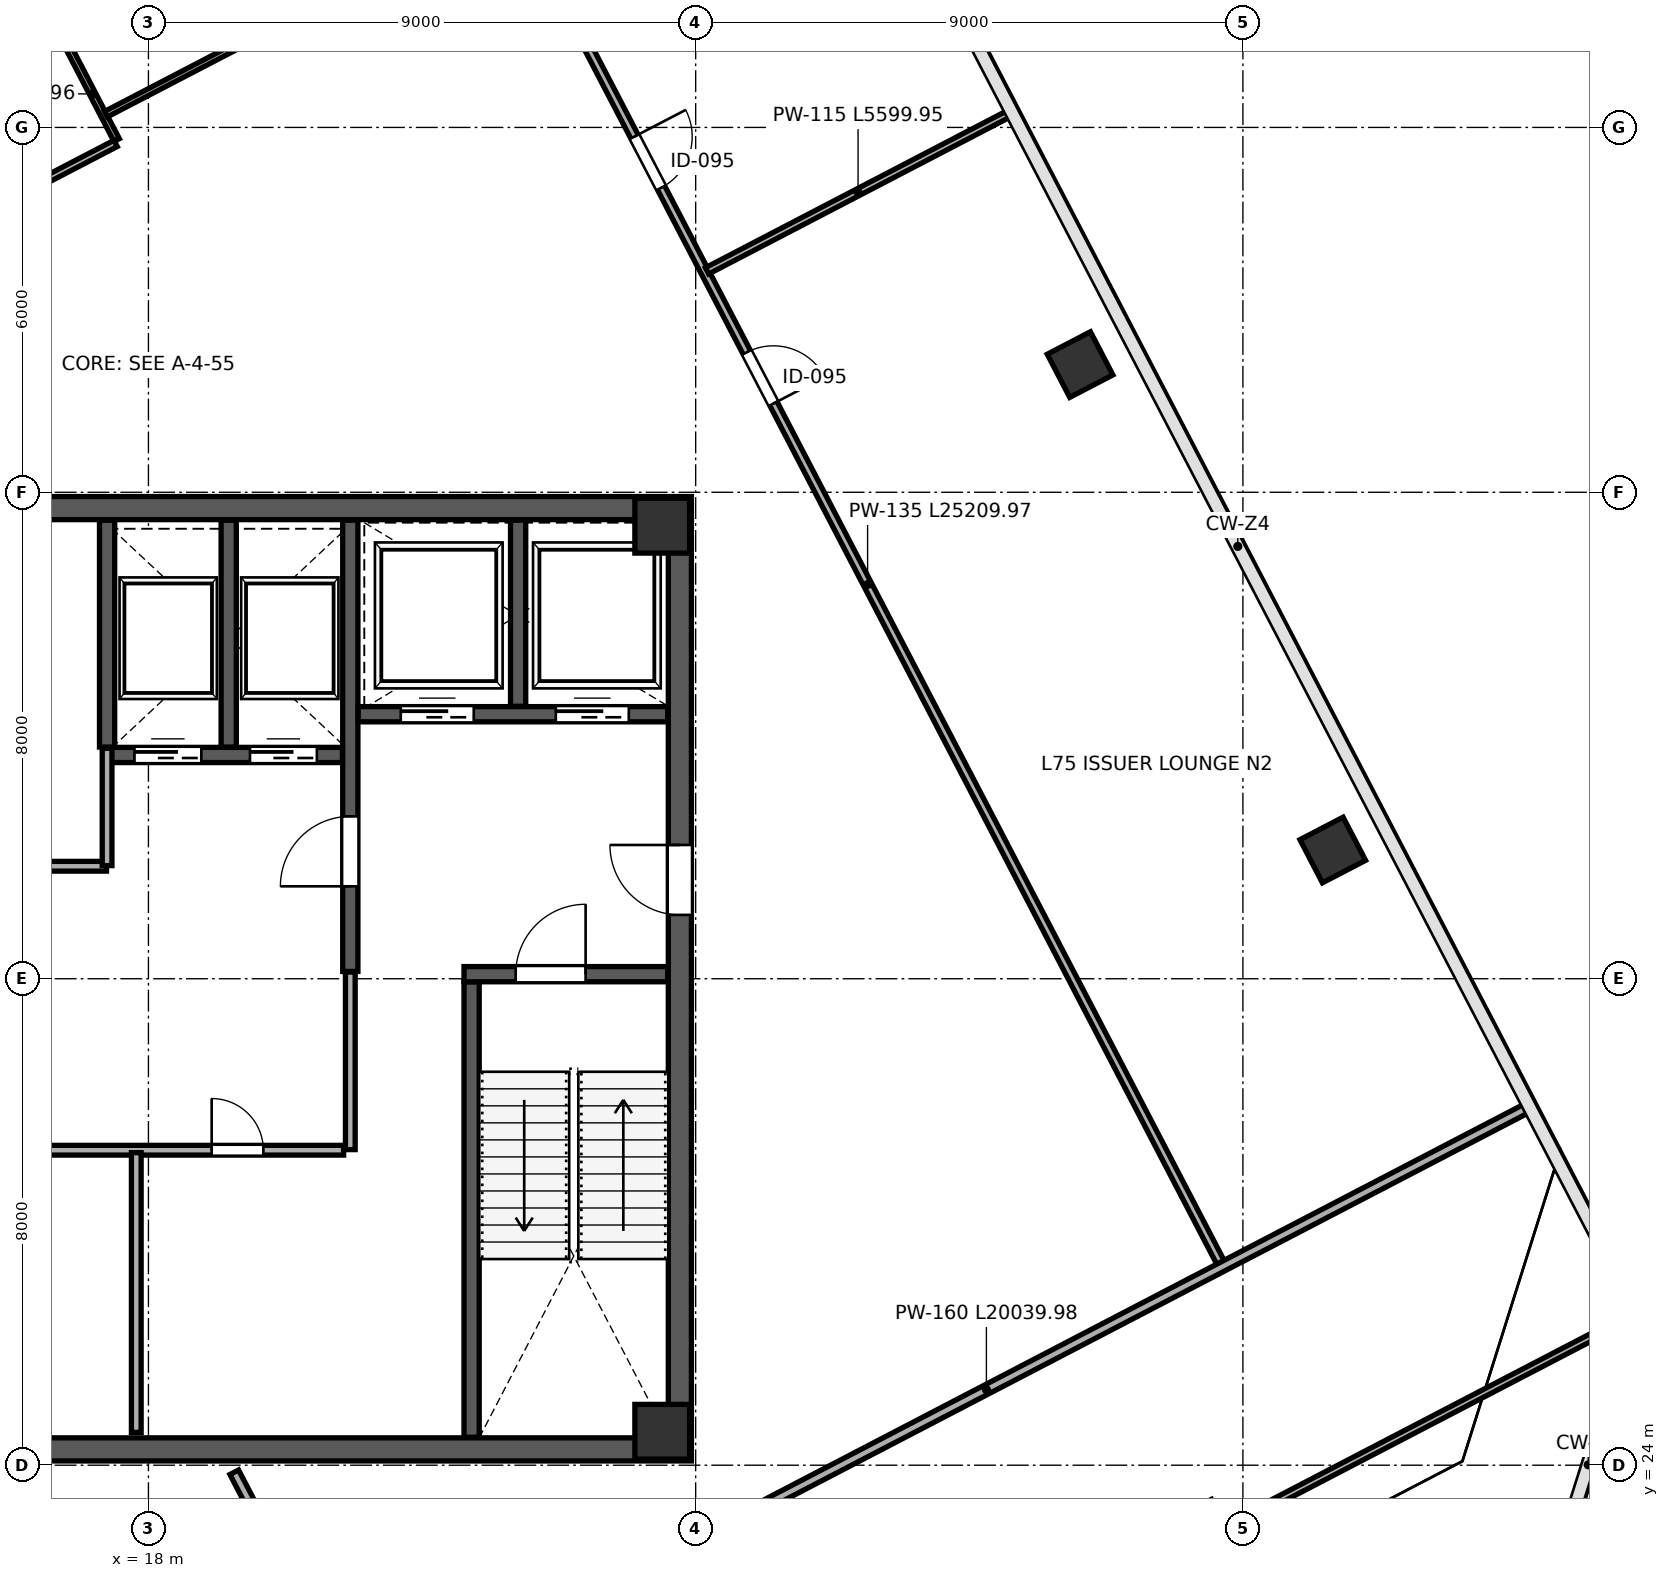
"""IFC4 building model, lengths in metres.
Left out: names, types, materials, properties, quantities, classifications, styles, units other than length and angle.
Written with IfcOpenShell. Run it as: python <this file> out.ifc"""

import sys

from ifc_helpers import new_model, si_unit, direction, frame, frame_2d, origin, origin_2d, place, context, subcontext, project, spatial, rectangle, extrude, source, transform, mapped, element, fill, save


model = new_model("IFC4")
c1 = context("Model", 3, precision=1e-05, world=origin(), true_north=direction((0.0, 1.0)))
c2 = subcontext(c1, "Body", "Model", "MODEL_VIEW")
j1 = project(units=[si_unit("LENGTHUNIT", "METRE"), si_unit("PLANEANGLEUNIT", "RADIAN")], contexts=[c1])
p1 = place(None, origin())
s1 = spatial("IfcSite", under=j1, at=p1, CompositionType="ELEMENT")
p2 = place(p1, origin())
s2 = spatial("IfcBuilding", under=s1, at=p2, CompositionType="ELEMENT")
p3 = place(p2, frame((0.0, 0.0, 332.4)))
s3 = spatial("IfcBuildingStorey", under=s2, at=p3, CompositionType="ELEMENT", Elevation=332.4)
m1 = source(origin(), c2, "Body", "SweptSolid", [
    extrude(rectangle(XDim=0.9, YDim=0.9, at=origin_2d()), origin(), (0.0, 0.0, 1.0), 4.199),
])
for number, where, z_axis, x_axis in (
    (1, (26.45, 24.55, 0.001), (0.0, 0.0, 1.0), (1.0, 0.0, 0.0)),
    (2, (26.45, 39.45, 0.001), (0.0, 0.0, 1.0), (1.0, 0.0, 0.0)),
):
    element("IfcColumn", number, at=place(p3, frame(where, z_axis=z_axis, x_axis=x_axis)), inside=s3, PredefinedType="COLUMN", context=c2, shape_type="MappedRepresentation", body=[
        mapped(m1, transform((0.0, 0.0, 0.0), scale=1.0)),
    ])
m2 = source(origin(), c2, "Body", "SweptSolid", [
    extrude(rectangle(XDim=0.8, YDim=0.8, at=origin_2d()), origin(), (0.0, 0.0, 1.0), 4.199),
])
for number, where, z_axis, x_axis in (
    (3, (33.322, 42.1, 0.001), (0.0, 0.0, 1.0), (-0.462, 0.887, 0.0)),
    (4, (37.478, 34.117, 0.001), (0.0, 0.0, 1.0), (-0.462, 0.887, 0.0)),
):
    element("IfcColumn", number, at=place(p3, frame(where, z_axis=z_axis, x_axis=x_axis)), inside=s3, PredefinedType="COLUMN", context=c2, shape_type="MappedRepresentation", body=[
        mapped(m2, transform((0.0, 0.0, 0.0), scale=1.0)),
    ])
p4 = place(p3, frame((26.74, 24.45, 0.0), z_axis=(0.0, 0.0, 1.0), x_axis=(0.0, 1.0, 0.0)))
e5 = element("IfcWall", 5, at=p4, inside=s3, PredefinedType="SHEAR", context=c2, shape_type="SweptSolid", body=[
    extrude(rectangle(XDim=15.1, YDim=0.38, at=frame_2d((7.55, 0.0))), origin(), (0.0, 0.0, 1.0), 3.96),
])
p5 = place(p4, frame((8.6, 0.0, 0.0)))
e6 = element("IfcOpeningElement", 6, at=p5, cuts=e5, PredefinedType="OPENING", context=c2, shape_type="SweptSolid", body=[
    extrude(rectangle(XDim=1.15, YDim=2.2, at=frame_2d((0.575, 1.1))), frame((0.0, 0.2, 0.0), z_axis=(0.0, -1.0, 0.0), x_axis=(1.0, 0.0, 0.0)), (0.0, 0.0, 1.0), 0.4),
])
for number, where, z_axis, x_axis in (
    (7, (9.07, 24.26, 0.0), (0.0, 0.0, 1.0), (1.0, 0.0, 0.0)),
    (8, (9.07, 39.74, 0.0), (0.0, 0.0, 1.0), (1.0, 0.0, 0.0)),
):
    element("IfcWall", number, at=place(p3, frame(where, z_axis=z_axis, x_axis=x_axis)), inside=s3, PredefinedType="SHEAR", context=c2, shape_type="SweptSolid", body=[
        extrude(rectangle(XDim=17.86, YDim=0.38, at=frame_2d((8.93, 0.0))), origin(), (0.0, 0.0, 1.0), 3.96),
    ])
p6 = place(p3, frame((23.315, 24.46, 0.0), z_axis=(0.0, 0.0, 1.0), x_axis=(0.0, 1.0, 0.0)))
e9 = element("IfcWall", 9, at=p6, inside=s3, PredefinedType="SHEAR", context=c2, shape_type="SweptSolid", body=[
    extrude(rectangle(XDim=7.49, YDim=0.25, at=frame_2d((3.745, 0.0))), origin(), (0.0, 0.0, 1.0), 3.96),
])
p7 = place(p3, frame((23.19, 32.075, 0.0), z_axis=(0.0, 0.0, 1.0), x_axis=(1.0, 0.0, 0.0)))
e10 = element("IfcWall", 10, at=p7, inside=s3, PredefinedType="SHEAR", context=c2, shape_type="SweptSolid", body=[
    extrude(rectangle(XDim=3.35, YDim=0.25, at=frame_2d((1.675, 0.0))), origin(), (0.0, 0.0, 1.0), 3.96),
])
p8 = place(p7, frame((0.85, 0.0, 0.0)))
e11 = element("IfcOpeningElement", 11, at=p8, cuts=e10, PredefinedType="OPENING", context=c2, shape_type="SweptSolid", body=[
    extrude(rectangle(XDim=1.15, YDim=2.2, at=frame_2d((0.575, 1.1))), frame((0.0, 0.135, 0.0), z_axis=(0.0, -1.0, 0.0), x_axis=(1.0, 0.0, 0.0)), (0.0, 0.0, 1.0), 0.27),
])
p9 = place(p3, frame((21.32, 32.12, 0.0), z_axis=(0.0, 0.0, 1.0), x_axis=(0.0, 1.0, 0.0)))
e12 = element("IfcWall", 12, at=p9, inside=s3, PredefinedType="SHEAR", context=c2, shape_type="SweptSolid", body=[
    extrude(rectangle(XDim=7.42, YDim=0.25, at=frame_2d((3.71, 0.0))), origin(), (0.0, 0.0, 1.0), 3.96),
])
p10 = place(p9, frame((1.4, 0.0, 0.0)))
e13 = element("IfcOpeningElement", 13, at=p10, cuts=e12, PredefinedType="OPENING", context=c2, shape_type="SweptSolid", body=[
    extrude(rectangle(XDim=1.15, YDim=2.2, at=frame_2d((0.575, 1.1))), frame((0.0, 0.135, 0.0), z_axis=(0.0, -1.0, 0.0), x_axis=(1.0, 0.0, 0.0)), (0.0, 0.0, 1.0), 0.27),
])
p11 = place(p3, frame((21.45, 36.35, 0.0), z_axis=(0.0, 0.0, 1.0), x_axis=(1.0, 0.0, 0.0)))
e14 = element("IfcWall", 14, at=p11, inside=s3, PredefinedType="SHEAR", context=c2, shape_type="SweptSolid", body=[
    extrude(rectangle(XDim=5.09, YDim=0.25, at=frame_2d((2.545, 0.0))), origin(), (0.0, 0.0, 1.0), 3.96),
])
p12 = place(p11, frame((0.7, 0.0, 0.0)))
e15 = element("IfcOpeningElement", 15, at=p12, cuts=e14, PredefinedType="OPENING", context=c2, shape_type="SweptSolid", body=[
    extrude(rectangle(XDim=1.2, YDim=2.2, at=frame_2d((0.6, 1.1))), frame((0.0, 0.135, 0.0), z_axis=(0.0, -1.0, 0.0), x_axis=(1.0, 0.0, 0.0)), (0.0, 0.0, 1.0), 0.27),
])
p13 = place(p11, frame((3.25, 0.0, 0.0)))
e16 = element("IfcOpeningElement", 16, at=p13, cuts=e14, PredefinedType="OPENING", context=c2, shape_type="SweptSolid", body=[
    extrude(rectangle(XDim=1.2, YDim=2.2, at=frame_2d((0.6, 1.1))), frame((0.0, 0.135, 0.0), z_axis=(0.0, -1.0, 0.0), x_axis=(1.0, 0.0, 0.0)), (0.0, 0.0, 1.0), 0.27),
])
p14 = place(p3, frame((24.08, 36.48, 0.0), z_axis=(0.0, 0.0, 1.0), x_axis=(0.0, 1.0, 0.0)))
e17 = element("IfcWall", 17, at=p14, inside=s3, PredefinedType="SHEAR", context=c2, shape_type="SweptSolid", body=[
    extrude(rectangle(XDim=3.06, YDim=0.25, at=frame_2d((1.53, 0.0))), origin(), (0.0, 0.0, 1.0), 3.96),
])
p15 = place(p3, frame((17.32, 35.68, 0.0), z_axis=(0.0, 0.0, 1.0), x_axis=(1.0, 0.0, 0.0)))
e18 = element("IfcWall", 18, at=p15, inside=s3, PredefinedType="SHEAR", context=c2, shape_type="SweptSolid", body=[
    extrude(rectangle(XDim=3.87, YDim=0.25, at=frame_2d((1.935, 0.0))), origin(), (0.0, 0.0, 1.0), 3.96),
])
p16 = place(p15, frame((0.45, 0.0, 0.0)))
e19 = element("IfcOpeningElement", 19, at=p16, cuts=e18, PredefinedType="OPENING", context=c2, shape_type="SweptSolid", body=[
    extrude(rectangle(XDim=1.1, YDim=2.2, at=frame_2d((0.55, 1.1))), frame((0.0, 0.135, 0.0), z_axis=(0.0, -1.0, 0.0), x_axis=(1.0, 0.0, 0.0)), (0.0, 0.0, 1.0), 0.27),
])
p17 = place(p15, frame((2.35, 0.0, 0.0)))
e20 = element("IfcOpeningElement", 20, at=p17, cuts=e18, PredefinedType="OPENING", context=c2, shape_type="SweptSolid", body=[
    extrude(rectangle(XDim=1.1, YDim=2.2, at=frame_2d((0.55, 1.1))), frame((0.0, 0.135, 0.0), z_axis=(0.0, -1.0, 0.0), x_axis=(1.0, 0.0, 0.0)), (0.0, 0.0, 1.0), 0.27),
])
for number, where, z_axis, x_axis in (
    (21, (17.32, 35.81, 0.0), (0.0, 0.0, 1.0), (0.0, 1.0, 0.0)),
    (22, (19.32, 35.81, 0.0), (0.0, 0.0, 1.0), (0.0, 1.0, 0.0)),
):
    element("IfcWall", number, at=place(p3, frame(where, z_axis=z_axis, x_axis=x_axis)), inside=s3, PredefinedType="SHEAR", context=c2, shape_type="SweptSolid", body=[
        extrude(rectangle(XDim=3.73, YDim=0.25, at=frame_2d((1.865, 0.0))), origin(), (0.0, 0.0, 1.0), 3.96),
    ])
p18 = place(p3, frame((13.21, 33.85, 0.0), z_axis=(0.0, 0.0, 1.0), x_axis=(1.0, 0.0, 0.0)))
e23 = element("IfcWall", 23, at=p18, inside=s3, PredefinedType="PARTITIONING", context=c2, shape_type="SweptSolid", body=[
    extrude(rectangle(XDim=4.1, YDim=0.16, at=frame_2d((2.05, 0.0))), origin(), (0.0, 0.0, 1.0), 3.96),
])
p19 = place(p18, frame((1.35, 0.0, 0.0)))
e24 = element("IfcOpeningElement", 24, at=p19, cuts=e23, PredefinedType="OPENING", context=c2, shape_type="SweptSolid", body=[
    extrude(rectangle(XDim=0.9, YDim=2.15, at=frame_2d((0.45, 1.075))), frame((0.0, 0.09, 0.0), z_axis=(0.0, -1.0, 0.0), x_axis=(1.0, 0.0, 0.0)), (0.0, 0.0, 1.0), 0.18),
])
p20 = place(p3, frame((17.32, 33.86, 0.0), z_axis=(0.0, 0.0, 1.0), x_axis=(0.0, 1.0, 0.0)))
e25 = element("IfcWall", 25, at=p20, inside=s3, PredefinedType="PARTITIONING", context=c2, shape_type="SweptSolid", body=[
    extrude(rectangle(XDim=1.93, YDim=0.16, at=frame_2d((0.965, 0.0))), origin(), (0.0, 0.0, 1.0), 3.96),
])
p21 = place(p3, frame((12.84, 29.18, 0.0), z_axis=(0.0, 0.0, 1.0), x_axis=(1.0, 0.0, 0.0)))
e26 = element("IfcWall", 26, at=p21, inside=s3, PredefinedType="PARTITIONING", context=c2, shape_type="SweptSolid", body=[
    extrude(rectangle(XDim=8.37, YDim=0.16, at=frame_2d((4.185, 0.0))), origin(), (0.0, 0.0, 1.0), 3.96),
])
p22 = place(p21, frame((2.1, 0.0, 0.0)))
e27 = element("IfcOpeningElement", 27, at=p22, cuts=e26, PredefinedType="OPENING", context=c2, shape_type="SweptSolid", body=[
    extrude(rectangle(XDim=0.9, YDim=2.15, at=frame_2d((0.45, 1.075))), frame((0.0, 0.09, 0.0), z_axis=(0.0, -1.0, 0.0), x_axis=(1.0, 0.0, 0.0)), (0.0, 0.0, 1.0), 0.18),
])
p23 = place(p21, frame((6.2, 0.0, 0.0)))
e28 = element("IfcOpeningElement", 28, at=p23, cuts=e26, PredefinedType="OPENING", context=c2, shape_type="SweptSolid", body=[
    extrude(rectangle(XDim=0.85, YDim=2.1, at=frame_2d((0.425, 1.05))), frame((0.0, 0.09, 0.0), z_axis=(0.0, -1.0, 0.0), x_axis=(1.0, 0.0, 0.0)), (0.0, 0.0, 1.0), 0.18),
])
p24 = place(p3, frame((17.8, 24.54, 0.0), z_axis=(0.0, 0.0, 1.0), x_axis=(0.0, 1.0, 0.0)))
e29 = element("IfcWall", 29, at=p24, inside=s3, PredefinedType="PARTITIONING", context=c2, shape_type="SweptSolid", body=[
    extrude(rectangle(XDim=4.6, YDim=0.16, at=frame_2d((2.3, 0.0))), origin(), (0.0, 0.0, 1.0), 3.96),
])
p25 = place(p3, frame((21.32, 29.19, 0.0), z_axis=(0.0, 0.0, 1.0), x_axis=(0.0, 1.0, 0.0)))
e30 = element("IfcWall", 30, at=p25, inside=s3, PredefinedType="PARTITIONING", context=c2, shape_type="SweptSolid", body=[
    extrude(rectangle(XDim=2.92, YDim=0.16, at=frame_2d((1.46, 0.0))), origin(), (0.0, 0.0, 1.0), 3.96),
])
p26 = place(p3, frame((19.411, 23.885, 0.0), z_axis=(0.0, 0.0, 1.0), x_axis=(0.461717603384, -0.887026975196, 0.0)))
e31 = element("IfcWall", 31, at=p26, inside=s3, PredefinedType="PARTITIONING", context=c2, shape_type="SweptSolid", body=[
    extrude(rectangle(XDim=4.466, YDim=0.16, at=frame_2d((2.233, 0.0))), origin(), (0.0, 0.0, 1.0), 3.96),
])
p27 = place(p3, frame((24.007, 49.664, 0.0), z_axis=(0.0, 0.0, 1.0), x_axis=(0.461753963132, -0.887008048178, 0.0)))
e32 = element("IfcWall", 32, at=p27, inside=s3, PredefinedType="PARTITIONING", context=c2, shape_type="SweptSolid", body=[
    extrude(rectangle(XDim=25.21, YDim=0.135, at=frame_2d((12.605, 0.0))), origin(), (0.0, 0.0, 1.0), 3.96),
])
p28 = place(p27, frame((4.3, 0.0, 0.0)))
e33 = element("IfcOpeningElement", 33, at=p28, cuts=e32, PredefinedType="OPENING", context=c2, shape_type="SweptSolid", body=[
    extrude(rectangle(XDim=0.95, YDim=2.15, at=frame_2d((0.475, 1.075))), frame((0.0, 0.078, 0.0), z_axis=(0.0, -1.0, 0.0), x_axis=(1.0, 0.0, 0.0)), (0.0, 0.0, 1.0), 0.155),
])
p29 = place(p27, frame((8.3, 0.0, 0.0)))
e34 = element("IfcOpeningElement", 34, at=p29, cuts=e32, PredefinedType="OPENING", context=c2, shape_type="SweptSolid", body=[
    extrude(rectangle(XDim=0.95, YDim=2.15, at=frame_2d((0.475, 1.075))), frame((0.0, 0.078, 0.0), z_axis=(0.0, -1.0, 0.0), x_axis=(1.0, 0.0, 0.0)), (0.0, 0.0, 1.0), 0.155),
])
p30 = place(p3, frame((27.187, 43.641, 0.0), z_axis=(0.0, 0.0, 1.0), x_axis=(0.886991844597, 0.461785088129, 0.0)))
e35 = element("IfcWall", 35, at=p30, inside=s3, PredefinedType="PARTITIONING", context=c2, shape_type="SweptSolid", body=[
    extrude(rectangle(XDim=5.6, YDim=0.115, at=frame_2d((2.8, 0.0))), origin(), (0.0, 0.0, 1.0), 3.295),
])
p31 = place(p3, frame((15.894, 48.833, 0.0), z_axis=(0.0, 0.0, 1.0), x_axis=(0.461760597426, -0.8870045945, 0.0)))
e36 = element("IfcWall", 36, at=p31, inside=s3, PredefinedType="PARTITIONING", context=c2, shape_type="SweptSolid", body=[
    extrude(rectangle(XDim=3.43, YDim=0.1, at=frame_2d((1.715, 0.0))), origin(), (0.0, 0.0, 1.0), 3.295),
])
p32 = place(p31, frame((0.25, 0.0, 0.0)))
e37 = element("IfcOpeningElement", 37, at=p32, cuts=e36, PredefinedType="OPENING", context=c2, shape_type="SweptSolid", body=[
    extrude(rectangle(XDim=0.9, YDim=2.15, at=frame_2d((0.45, 1.075))), frame((0.0, 0.06, 0.0), z_axis=(0.0, -1.0, 0.0), x_axis=(1.0, 0.0, 0.0)), (0.0, 0.0, 1.0), 0.12),
])
p33 = place(p3, frame((2.284, 37.836, 0.0), z_axis=(0.0, 0.0, 1.0), x_axis=(0.887016973522, 0.461736817553, 0.0)))
e38 = element("IfcWall", 38, at=p33, inside=s3, PredefinedType="PARTITIONING", context=c2, shape_type="SweptSolid", body=[
    extrude(rectangle(XDim=17.11, YDim=0.115, at=frame_2d((8.555, 0.0))), origin(), (0.0, 0.0, 1.0), 3.96),
])
p34 = place(p3, frame((17.301, 46.217, 0.0), z_axis=(0.0, 0.0, 1.0), x_axis=(0.887006461695, 0.461757010679, 0.0)))
e39 = element("IfcWall", 39, at=p34, inside=s3, PredefinedType="PARTITIONING", context=c2, shape_type="SweptSolid", body=[
    extrude(rectangle(XDim=12.472, YDim=0.1, at=frame_2d((6.236, 0.0))), origin(), (0.0, 0.0, 1.0), 3.96),
])
p35 = place(p3, frame((22.893, 20.617, 0.0), z_axis=(0.0, 0.0, 1.0), x_axis=(0.887013262899, 0.461743945755, 0.0)))
e40 = element("IfcWall", 40, at=p35, inside=s3, PredefinedType="PARTITIONING", context=c2, shape_type="SweptSolid", body=[
    extrude(rectangle(XDim=20.04, YDim=0.16, at=frame_2d((10.02, 0.0))), origin(), (0.0, 0.0, 1.0), 3.96),
])
p36 = place(p3, frame((24.662, 17.22, 0.0), z_axis=(0.0, 0.0, 1.0), x_axis=(0.887015173056, 0.461740276312, 0.0)))
e41 = element("IfcWall", 41, at=p36, inside=s3, PredefinedType="PARTITIONING", context=c2, shape_type="SweptSolid", body=[
    extrude(rectangle(XDim=20.012, YDim=0.115, at=frame_2d((10.006, 0.0))), origin(), (0.0, 0.0, 1.0), 2.795),
])
m3 = source(origin(), c2, "Body", "SweptSolid", [
    extrude(rectangle(XDim=1.15, YDim=2.2, at=frame_2d((0.575, 1.1))), frame((0.0, 0.025, 0.0), z_axis=(0.0, -1.0, 0.0), x_axis=(1.0, 0.0, 0.0)), (0.0, 0.0, 1.0), 0.05),
])
p37 = place(p10, origin())
e42 = element("IfcDoor", 42, at=p37, inside=s3, OperationType="SINGLE_SWING_LEFT", PredefinedType="DOOR", context=c2, shape_type="MappedRepresentation", body=[
    mapped(m3, transform((0.0, 0.0, 0.0), scale=1.0)),
])
fill(e13, e42)
m4 = source(origin(), c2, "Body", "SweptSolid", [
    extrude(rectangle(XDim=1.15, YDim=2.2, at=frame_2d((0.575, 1.1))), frame((0.0, 0.025, 0.0), z_axis=(0.0, -1.0, 0.0), x_axis=(1.0, 0.0, 0.0)), (0.0, 0.0, 1.0), 0.05),
])
p38 = place(p8, origin())
e43 = element("IfcDoor", 43, at=p38, inside=s3, OperationType="SINGLE_SWING_RIGHT", PredefinedType="DOOR", context=c2, shape_type="MappedRepresentation", body=[
    mapped(m4, transform((0.0, 0.0, 0.0), scale=1.0)),
])
fill(e11, e43)
p39 = place(p5, origin())
e44 = element("IfcDoor", 44, at=p39, inside=s3, OperationType="SINGLE_SWING_RIGHT", PredefinedType="DOOR", context=c2, shape_type="MappedRepresentation", body=[
    mapped(m3, transform((0.0, 0.0, 0.0), scale=1.0)),
])
fill(e6, e44)
m5 = source(origin(), c2, "Body", "SweptSolid", [
    extrude(rectangle(XDim=1.1, YDim=2.2, at=frame_2d((0.55, 1.1))), frame((0.0, 0.025, 0.0), z_axis=(0.0, -1.0, 0.0), x_axis=(1.0, 0.0, 0.0)), (0.0, 0.0, 1.0), 0.05),
])
p40 = place(p16, origin())
e45 = element("IfcDoor", 45, at=p40, inside=s3, OperationType="SLIDING_TO_LEFT", PredefinedType="DOOR", context=c2, shape_type="MappedRepresentation", body=[
    mapped(m5, transform((0.0, 0.0, 0.0), scale=1.0)),
])
fill(e19, e45)
p41 = place(p17, origin())
e46 = element("IfcDoor", 46, at=p41, inside=s3, OperationType="SLIDING_TO_RIGHT", PredefinedType="DOOR", context=c2, shape_type="MappedRepresentation", body=[
    mapped(m5, transform((0.0, 0.0, 0.0), scale=1.0)),
])
fill(e20, e46)
m6 = source(origin(), c2, "Body", "SweptSolid", [
    extrude(rectangle(XDim=1.2, YDim=2.2, at=frame_2d((0.6, 1.1))), frame((0.0, 0.025, 0.0), z_axis=(0.0, -1.0, 0.0), x_axis=(1.0, 0.0, 0.0)), (0.0, 0.0, 1.0), 0.05),
])
p42 = place(p12, origin())
e47 = element("IfcDoor", 47, at=p42, inside=s3, OperationType="SLIDING_TO_LEFT", PredefinedType="DOOR", context=c2, shape_type="MappedRepresentation", body=[
    mapped(m6, transform((0.0, 0.0, 0.0), scale=1.0)),
])
fill(e15, e47)
p43 = place(p13, origin())
e48 = element("IfcDoor", 48, at=p43, inside=s3, OperationType="SLIDING_TO_RIGHT", PredefinedType="DOOR", context=c2, shape_type="MappedRepresentation", body=[
    mapped(m6, transform((0.0, 0.0, 0.0), scale=1.0)),
])
fill(e16, e48)
m7 = source(origin(), c2, "Body", "SweptSolid", [
    extrude(rectangle(XDim=0.85, YDim=2.1, at=frame_2d((0.425, 1.05))), frame((0.0, 0.025, 0.0), z_axis=(0.0, -1.0, 0.0), x_axis=(1.0, 0.0, 0.0)), (0.0, 0.0, 1.0), 0.05),
])
p44 = place(p23, origin())
e49 = element("IfcDoor", 49, at=p44, inside=s3, OperationType="SINGLE_SWING_LEFT", PredefinedType="DOOR", context=c2, shape_type="MappedRepresentation", body=[
    mapped(m7, transform((0.0, 0.0, 0.0), scale=1.0)),
])
fill(e28, e49)
m8 = source(origin(), c2, "Body", "SweptSolid", [
    extrude(rectangle(XDim=0.95, YDim=2.15, at=frame_2d((0.475, 1.075))), frame((0.0, 0.025, 0.0), z_axis=(0.0, -1.0, 0.0), x_axis=(1.0, 0.0, 0.0)), (0.0, 0.0, 1.0), 0.05),
])
p45 = place(p28, origin())
e50 = element("IfcDoor", 50, at=p45, inside=s3, OperationType="SINGLE_SWING_LEFT", PredefinedType="DOOR", context=c2, shape_type="MappedRepresentation", body=[
    mapped(m8, transform((0.0, 0.0, 0.0), scale=1.0)),
])
fill(e33, e50)
p46 = place(p29, origin())
e51 = element("IfcDoor", 51, at=p46, inside=s3, OperationType="SINGLE_SWING_RIGHT", PredefinedType="DOOR", context=c2, shape_type="MappedRepresentation", body=[
    mapped(m8, transform((0.0, 0.0, 0.0), scale=1.0)),
])
fill(e34, e51)
save(model, sys.argv[1])
